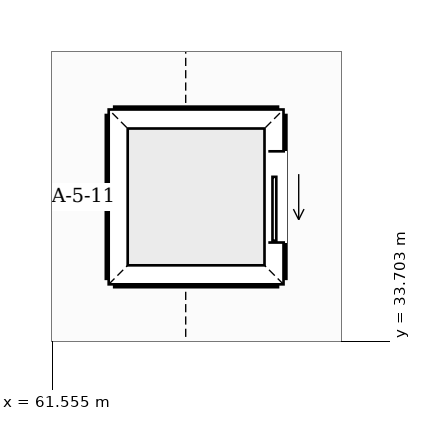
"""IFC4 building model, lengths in metres.
Left out: names, types, materials, properties, quantities, classifications, styles, units other than length and angle.
Written with IfcOpenShell. Run it as: python <this file> out.ifc"""

import sys

from ifc_helpers import new_model, si_unit, direction, frame, frame_2d, origin, place, context, subcontext, project, spatial, rectangle, extrude, element, fill, save


model = new_model("IFC4")
c1 = context("Model", 3, precision=1e-05, world=origin(), true_north=direction((0.0, 1.0)))
c2 = subcontext(c1, "Body", "Model", "MODEL_VIEW")
j1 = project(units=[si_unit("LENGTHUNIT", "METRE"), si_unit("PLANEANGLEUNIT", "RADIAN")], contexts=[c1])
p1 = place(None, origin())
s1 = spatial("IfcSite", under=j1, at=p1, CompositionType="ELEMENT")
p2 = place(p1, origin())
s2 = spatial("IfcBuilding", under=s1, at=p2, CompositionType="ELEMENT")
p3 = place(p2, origin())
s3 = spatial("IfcBuildingStorey", under=s2, at=p3, CompositionType="ELEMENT", Elevation=0.0)
for number, where, z_axis, x_axis in (
    (1, (62.39, 36.66, 0.0), (0.0, 0.0, 1.0), (1.0, 0.0, 0.0)),
    (2, (62.39, 34.54, 0.0), (0.0, 0.0, 1.0), (1.0, 0.0, 0.0)),
):
    element("IfcWall", number, at=place(p3, frame(where, z_axis=z_axis, x_axis=x_axis)), inside=s3, PredefinedType="SHEAR", context=c2, shape_type="SweptSolid", body=[
        extrude(rectangle(XDim=2.12, YDim=0.22, at=frame_2d((1.06, 0.0))), origin(), (0.0, 0.0, 1.0), 5.15),
    ])
p4 = place(p3, frame((64.51, 34.54, 0.0), z_axis=(0.0, 0.0, 1.0), x_axis=(0.0, 1.0, 0.0)))
e3 = element("IfcWall", 3, at=p4, inside=s3, PredefinedType="SHEAR", context=c2, shape_type="SweptSolid", body=[
    extrude(rectangle(XDim=2.12, YDim=0.22, at=frame_2d((1.06, 0.0))), origin(), (0.0, 0.0, 1.0), 5.15),
])
p5 = place(p4, frame((0.46, 0.0, 0.0)))
e4 = element("IfcOpeningElement", 4, at=p5, cuts=e3, PredefinedType="OPENING", context=c2, shape_type="SweptSolid", body=[
    extrude(rectangle(XDim=1.2, YDim=2.25, at=frame_2d((0.6, 1.125))), frame((0.0, 0.12, 0.0), z_axis=(0.0, -1.0, 0.0), x_axis=(1.0, 0.0, 0.0)), (0.0, 0.0, 1.0), 0.24),
])
p6 = place(p3, frame((62.39, 34.54, 0.0), z_axis=(0.0, 0.0, 1.0), x_axis=(0.0, 1.0, 0.0)))
e5 = element("IfcWall", 5, at=p6, inside=s3, PredefinedType="SHEAR", context=c2, shape_type="SweptSolid", body=[
    extrude(rectangle(XDim=2.12, YDim=0.22, at=frame_2d((1.06, 0.0))), origin(), (0.0, 0.0, 1.0), 5.15),
])
p7 = place(p5, origin())
e6 = element("IfcDoor", 6, at=p7, inside=s3, OperationType="SLIDING_TO_LEFT", PredefinedType="DOOR", context=c2, shape_type="SweptSolid", body=[
    extrude(rectangle(XDim=1.2, YDim=2.25, at=frame_2d((0.6, 1.125))), frame((0.0, 0.025, 0.0), z_axis=(0.0, -1.0, 0.0), x_axis=(1.0, 0.0, 0.0)), (0.0, 0.0, 1.0), 0.05),
])
fill(e4, e6)
save(model, sys.argv[1])
